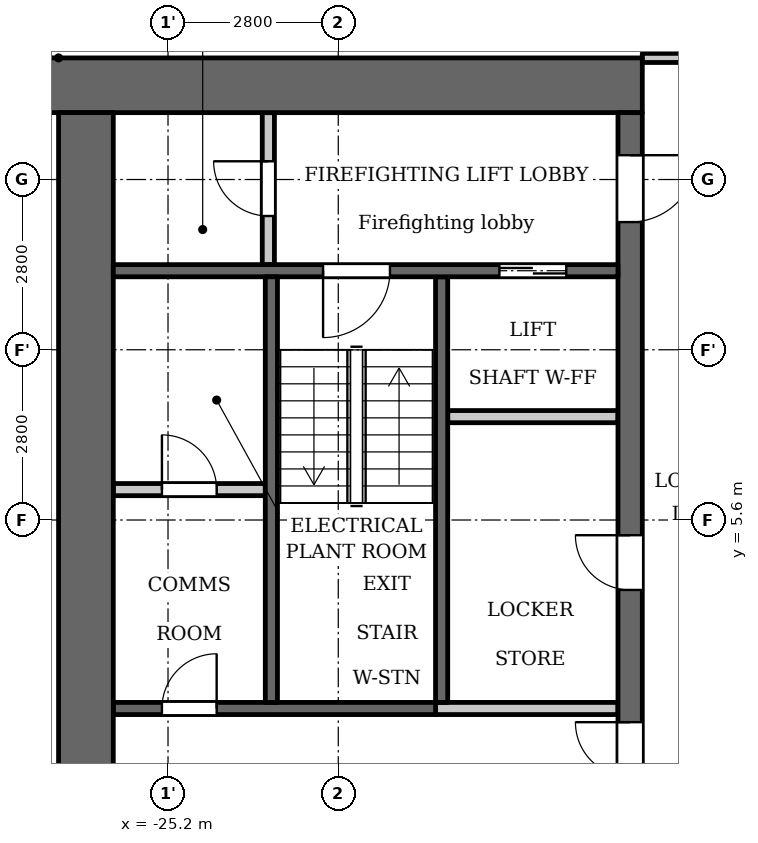
"""IFC4 building model, lengths in metres.
Left out: names, types, materials, properties, quantities, classifications, styles, units other than length and angle.
Written with IfcOpenShell. Run it as: python <this file> out.ifc"""

import sys

from ifc_helpers import new_model, si_unit, direction, frame, frame_2d, origin, place, context, subcontext, project, spatial, rectangle, extrude, element, fill, save


model = new_model("IFC4")
c1 = context("Model", 3, precision=1e-05, world=origin(), true_north=direction((0.0, 1.0)))
c2 = subcontext(c1, "Body", "Model", "MODEL_VIEW")
j1 = project(units=[si_unit("LENGTHUNIT", "METRE"), si_unit("PLANEANGLEUNIT", "RADIAN")], contexts=[c1])
p1 = place(None, origin())
s1 = spatial("IfcSite", under=j1, at=p1, CompositionType="ELEMENT")
p2 = place(p1, origin())
s2 = spatial("IfcBuilding", under=s1, at=p2, CompositionType="ELEMENT")
p3 = place(p2, frame((0.0, 0.0, 55.0)))
s3 = spatial("IfcBuildingStorey", under=s2, at=p3, CompositionType="ELEMENT", Elevation=55.0)
p4 = place(p3, frame((-20.7, 2.6, 0.0), z_axis=(0.0, 0.0, 1.0), x_axis=(0.0, 1.0, 0.0)))
e1 = element("IfcWall", 1, at=p4, inside=s3, PredefinedType="SHEAR", context=c2, shape_type="SweptSolid", body=[
    extrude(rectangle(XDim=7.0, YDim=0.2, at=frame_2d((3.5, 0.0))), origin(), (0.0, 0.0, 1.0), 3.2),
])
p5 = place(p3, frame((-20.8, 2.5, 0.0), z_axis=(0.0, 0.0, 1.0), x_axis=(-1.0, 0.0, 0.0)))
e2 = element("IfcWall", 2, at=p5, inside=s3, PredefinedType="SHEAR", context=c2, shape_type="SweptSolid", body=[
    extrude(rectangle(XDim=5.3, YDim=0.2, at=frame_2d((2.65, 0.0))), origin(), (0.0, 0.0, 1.0), 3.2),
])
p6 = place(p5, frame((3.6, 0.0, 0.0)))
e3 = element("IfcOpeningElement", 3, at=p6, cuts=e2, PredefinedType="OPENING", context=c2, shape_type="SweptSolid", body=[
    extrude(rectangle(XDim=0.9, YDim=2.1, at=frame_2d((0.45, 1.05))), frame((0.0, 0.11, 0.0), z_axis=(0.0, -1.0, 0.0), x_axis=(1.0, 0.0, 0.0)), (0.0, 0.0, 1.0), 0.22),
])
p7 = place(p3, frame((-17.4, 12.75, 0.0), z_axis=(0.0, 0.0, 1.0), x_axis=(-1.0, 0.0, 0.0)))
e4 = element("IfcWall", 4, at=p7, inside=s3, PredefinedType="SHEAR", context=c2, shape_type="SweptSolid", body=[
    extrude(rectangle(XDim=10.4, YDim=0.9, at=frame_2d((5.2, 0.0))), origin(), (0.0, 0.0, 1.0), 3.2),
])
p8 = place(p3, frame((-17.6, -12.3, 0.0), z_axis=(0.0, 0.0, 1.0), x_axis=(0.0, 1.0, 0.0)))
e5 = element("IfcWall", 5, at=p8, inside=s3, PredefinedType="SHEAR", context=c2, shape_type="SweptSolid", body=[
    extrude(rectangle(XDim=24.6, YDim=0.4, at=frame_2d((12.3, 0.0))), origin(), (0.0, 0.0, 1.0), 3.2),
])
p9 = place(p8, frame((6.0, 0.0, 0.0)))
e6 = element("IfcOpeningElement", 6, at=p9, cuts=e5, PredefinedType="OPENING", context=c2, shape_type="SweptSolid", body=[
    extrude(rectangle(XDim=1.1, YDim=2.1, at=frame_2d((0.55, 1.05))), frame((0.0, 0.21, 0.0), z_axis=(0.0, -1.0, 0.0), x_axis=(1.0, 0.0, 0.0)), (0.0, 0.0, 1.0), 0.42),
])
p10 = place(p8, frame((8.4, 0.0, 0.0)))
e7 = element("IfcOpeningElement", 7, at=p10, cuts=e5, PredefinedType="OPENING", context=c2, shape_type="SweptSolid", body=[
    extrude(rectangle(XDim=1.1, YDim=2.1, at=frame_2d((0.55, 1.05))), frame((0.0, 0.21, 0.0), z_axis=(0.0, -1.0, 0.0), x_axis=(1.0, 0.0, 0.0)), (0.0, 0.0, 1.0), 0.42),
])
p11 = place(p8, frame((10.8, 0.0, 0.0)))
e8 = element("IfcOpeningElement", 8, at=p11, cuts=e5, PredefinedType="OPENING", context=c2, shape_type="SweptSolid", body=[
    extrude(rectangle(XDim=1.1, YDim=2.1, at=frame_2d((0.55, 1.05))), frame((0.0, 0.21, 0.0), z_axis=(0.0, -1.0, 0.0), x_axis=(1.0, 0.0, 0.0)), (0.0, 0.0, 1.0), 0.42),
])
p12 = place(p8, frame((16.75, 0.0, 0.0)))
e9 = element("IfcOpeningElement", 9, at=p12, cuts=e5, PredefinedType="OPENING", context=c2, shape_type="SweptSolid", body=[
    extrude(rectangle(XDim=0.9, YDim=2.1, at=frame_2d((0.45, 1.05))), frame((0.0, 0.21, 0.0), z_axis=(0.0, -1.0, 0.0), x_axis=(1.0, 0.0, 0.0)), (0.0, 0.0, 1.0), 0.42),
])
p13 = place(p8, frame((22.8, 0.0, 0.0)))
e10 = element("IfcOpeningElement", 10, at=p13, cuts=e5, PredefinedType="OPENING", context=c2, shape_type="SweptSolid", body=[
    extrude(rectangle(XDim=1.1, YDim=2.1, at=frame_2d((0.55, 1.05))), frame((0.0, 0.21, 0.0), z_axis=(0.0, -1.0, 0.0), x_axis=(1.0, 0.0, 0.0)), (0.0, 0.0, 1.0), 0.42),
])
p14 = place(p8, frame((0.7, 0.0, 0.0)))
e11 = element("IfcOpeningElement", 11, at=p14, cuts=e5, PredefinedType="OPENING", context=c2, shape_type="SweptSolid", body=[
    extrude(rectangle(XDim=1.1, YDim=2.1, at=frame_2d((0.55, 1.05))), frame((0.0, 0.21, 0.0), z_axis=(0.0, -1.0, 0.0), x_axis=(1.0, 0.0, 0.0)), (0.0, 0.0, 1.0), 0.42),
])
p15 = place(p8, frame((12.775, 0.0, 0.0)))
e12 = element("IfcOpeningElement", 12, at=p15, cuts=e5, PredefinedType="OPENING", context=c2, shape_type="SweptSolid", body=[
    extrude(rectangle(XDim=1.8, YDim=2.1, at=frame_2d((0.9, 1.05))), frame((0.0, 0.21, 0.0), z_axis=(0.0, -1.0, 0.0), x_axis=(1.0, 0.0, 0.0)), (0.0, 0.0, 1.0), 0.42),
])
p16 = place(p3, frame((-26.55, -12.3, 0.0), z_axis=(0.0, 0.0, 1.0), x_axis=(0.0, 1.0, 0.0)))
e13 = element("IfcWall", 13, at=p16, inside=s3, PredefinedType="SHEAR", context=c2, shape_type="SweptSolid", body=[
    extrude(rectangle(XDim=24.6, YDim=0.9, at=frame_2d((12.3, 0.0))), origin(), (0.0, 0.0, 1.0), 3.2),
])
p17 = place(p3, frame((-23.55, 9.8, 0.0), z_axis=(0.0, 0.0, 1.0), x_axis=(0.0, 1.0, 0.0)))
e14 = element("IfcWall", 14, at=p17, inside=s3, PredefinedType="PARTITIONING", context=c2, shape_type="SweptSolid", body=[
    extrude(rectangle(XDim=2.5, YDim=0.2, at=frame_2d((1.25, 0.0))), origin(), (0.0, 0.0, 1.0), 3.2),
])
p18 = place(p17, frame((0.8, 0.0, 0.0)))
e15 = element("IfcOpeningElement", 15, at=p18, cuts=e14, PredefinedType="OPENING", context=c2, shape_type="SweptSolid", body=[
    extrude(rectangle(XDim=0.9, YDim=2.1, at=frame_2d((0.45, 1.05))), frame((0.0, 0.11, 0.0), z_axis=(0.0, -1.0, 0.0), x_axis=(1.0, 0.0, 0.0)), (0.0, 0.0, 1.0), 0.22),
])
p19 = place(p3, frame((-23.6, 6.1, 0.0), z_axis=(0.0, 0.0, 1.0), x_axis=(-1.0, 0.0, 0.0)))
e16 = element("IfcWall", 16, at=p19, inside=s3, PredefinedType="PARTITIONING", context=c2, shape_type="SweptSolid", body=[
    extrude(rectangle(XDim=2.5, YDim=0.2, at=frame_2d((1.25, 0.0))), origin(), (0.0, 0.0, 1.0), 3.2),
])
p20 = place(p19, frame((0.8, 0.0, 0.0)))
e17 = element("IfcOpeningElement", 17, at=p20, cuts=e16, PredefinedType="OPENING", context=c2, shape_type="SweptSolid", body=[
    extrude(rectangle(XDim=0.9, YDim=2.1, at=frame_2d((0.45, 1.05))), frame((0.0, 0.11, 0.0), z_axis=(0.0, -1.0, 0.0), x_axis=(1.0, 0.0, 0.0)), (0.0, 0.0, 1.0), 0.22),
])
p21 = place(p3, frame((-17.8, 2.5, 0.0), z_axis=(0.0, 0.0, 1.0), x_axis=(-1.0, 0.0, 0.0)))
e18 = element("IfcWall", 18, at=p21, inside=s3, PredefinedType="PARTITIONING", context=c2, shape_type="SweptSolid", body=[
    extrude(rectangle(XDim=3.0, YDim=0.2, at=frame_2d((1.5, 0.0))), origin(), (0.0, 0.0, 1.0), 3.2),
])
p22 = place(p3, frame((-17.8, 7.3, 0.0), z_axis=(0.0, 0.0, 1.0), x_axis=(-1.0, 0.0, 0.0)))
e19 = element("IfcWall", 19, at=p22, inside=s3, PredefinedType="PARTITIONING", context=c2, shape_type="SweptSolid", body=[
    extrude(rectangle(XDim=2.8, YDim=0.2, at=frame_2d((1.4, 0.0))), origin(), (0.0, 0.0, 1.0), 3.2),
])
p23 = place(p3, frame((-17.8, 9.7, 0.0), z_axis=(0.0, 0.0, 1.0), x_axis=(-1.0, 0.0, 0.0)))
e20 = element("IfcWall", 20, at=p23, inside=s3, PredefinedType="SHEAR", context=c2, shape_type="SweptSolid", body=[
    extrude(rectangle(XDim=8.3, YDim=0.2, at=frame_2d((4.15, 0.0))), origin(), (0.0, 0.0, 1.0), 3.2),
])
p24 = place(p23, frame((0.85, 0.0, 0.0)))
e21 = element("IfcOpeningElement", 21, at=p24, cuts=e20, PredefinedType="OPENING", context=c2, shape_type="SweptSolid", body=[
    extrude(rectangle(XDim=1.1, YDim=2.1, at=frame_2d((0.55, 1.05))), frame((0.0, 0.11, 0.0), z_axis=(0.0, -1.0, 0.0), x_axis=(1.0, 0.0, 0.0)), (0.0, 0.0, 1.0), 0.22),
])
p25 = place(p23, frame((3.75, 0.0, 0.0)))
e22 = element("IfcOpeningElement", 22, at=p25, cuts=e20, PredefinedType="OPENING", context=c2, shape_type="SweptSolid", body=[
    extrude(rectangle(XDim=1.1, YDim=2.1, at=frame_2d((0.55, 1.05))), frame((0.0, 0.11, 0.0), z_axis=(0.0, -1.0, 0.0), x_axis=(1.0, 0.0, 0.0)), (0.0, 0.0, 1.0), 0.22),
])
p26 = place(p3, frame((-23.5, 2.6, 0.0), z_axis=(0.0, 0.0, 1.0), x_axis=(0.0, 1.0, 0.0)))
e23 = element("IfcWall", 23, at=p26, inside=s3, PredefinedType="SHEAR", context=c2, shape_type="SweptSolid", body=[
    extrude(rectangle(XDim=7.0, YDim=0.2, at=frame_2d((3.5, 0.0))), origin(), (0.0, 0.0, 1.0), 3.2),
])
p27 = place(p3, frame((-17.4, 13.2, 0.0), z_axis=(0.0, 0.0, 1.0), x_axis=(1.0, 0.0, 0.0)))
e24 = element("IfcWall", 24, at=p27, inside=s3, PredefinedType="PARTITIONING", context=c2, shape_type="SweptSolid", body=[
    extrude(rectangle(XDim=34.8, YDim=0.15, at=frame_2d((17.4, 0.0))), origin(), (0.0, 0.0, 1.0), 3.2),
])
p28 = place(p27, frame((0.75, 0.0, 0.0)))
e25 = element("IfcOpeningElement", 25, at=p28, cuts=e24, PredefinedType="OPENING", context=c2, shape_type="SweptSolid", body=[
    extrude(rectangle(XDim=1.0, YDim=2.1, at=frame_2d((0.5, 1.05))), frame((0.0, 0.085, 0.0), z_axis=(0.0, -1.0, 0.0), x_axis=(1.0, 0.0, 0.0)), (0.0, 0.0, 1.0), 0.17),
])
p29 = place(p27, frame((33.15, 0.0, 0.0)))
e26 = element("IfcOpeningElement", 26, at=p29, cuts=e24, PredefinedType="OPENING", context=c2, shape_type="SweptSolid", body=[
    extrude(rectangle(XDim=1.0, YDim=2.1, at=frame_2d((0.5, 1.05))), frame((0.0, 0.085, 0.0), z_axis=(0.0, -1.0, 0.0), x_axis=(1.0, 0.0, 0.0)), (0.0, 0.0, 1.0), 0.17),
])
p30 = place(p27, frame((6.85, 0.0, 0.0)))
e27 = element("IfcOpeningElement", 27, at=p30, cuts=e24, PredefinedType="OPENING", context=c2, shape_type="SweptSolid", body=[
    extrude(rectangle(XDim=1.0, YDim=2.1, at=frame_2d((0.5, 1.05))), frame((0.0, 0.085, 0.0), z_axis=(0.0, -1.0, 0.0), x_axis=(1.0, 0.0, 0.0)), (0.0, 0.0, 1.0), 0.17),
])
p31 = place(p27, frame((18.05, 0.0, 0.0)))
e28 = element("IfcOpeningElement", 28, at=p31, cuts=e24, PredefinedType="OPENING", context=c2, shape_type="SweptSolid", body=[
    extrude(rectangle(XDim=1.0, YDim=2.1, at=frame_2d((0.5, 1.05))), frame((0.0, 0.085, 0.0), z_axis=(0.0, -1.0, 0.0), x_axis=(1.0, 0.0, 0.0)), (0.0, 0.0, 1.0), 0.17),
])
p32 = place(p27, frame((29.25, 0.0, 0.0)))
e29 = element("IfcOpeningElement", 29, at=p32, cuts=e24, PredefinedType="OPENING", context=c2, shape_type="SweptSolid", body=[
    extrude(rectangle(XDim=1.0, YDim=2.1, at=frame_2d((0.5, 1.05))), frame((0.0, 0.085, 0.0), z_axis=(0.0, -1.0, 0.0), x_axis=(1.0, 0.0, 0.0)), (0.0, 0.0, 1.0), 0.17),
])
p33 = place(p12, origin())
e30 = element("IfcDoor", 30, at=p33, inside=s3, OperationType="SINGLE_SWING_LEFT", PredefinedType="DOOR", context=c2, shape_type="SweptSolid", body=[
    extrude(rectangle(XDim=0.9, YDim=2.1, at=frame_2d((0.45, 1.05))), frame((0.0, 0.025, 0.0), z_axis=(0.0, -1.0, 0.0), x_axis=(1.0, 0.0, 0.0)), (0.0, 0.0, 1.0), 0.05),
])
fill(e9, e30)
p34 = place(p24, origin())
e31 = element("IfcDoor", 31, at=p34, inside=s3, OperationType="DOUBLE_DOOR_SLIDING", PredefinedType="DOOR", context=c2, shape_type="SweptSolid", body=[
    extrude(rectangle(XDim=1.1, YDim=2.1, at=frame_2d((0.55, 1.05))), frame((0.0, 0.025, 0.0), z_axis=(0.0, -1.0, 0.0), x_axis=(1.0, 0.0, 0.0)), (0.0, 0.0, 1.0), 0.05),
])
fill(e21, e31)
p35 = place(p13, origin())
e32 = element("IfcDoor", 32, at=p35, inside=s3, OperationType="SINGLE_SWING_RIGHT", PredefinedType="DOOR", context=c2, shape_type="SweptSolid", body=[
    extrude(rectangle(XDim=1.1, YDim=2.1, at=frame_2d((0.55, 1.05))), frame((0.0, 0.025, 0.0), z_axis=(0.0, -1.0, 0.0), x_axis=(1.0, 0.0, 0.0)), (0.0, 0.0, 1.0), 0.05),
])
fill(e10, e32)
p36 = place(p18, origin())
e33 = element("IfcDoor", 33, at=p36, inside=s3, OperationType="SINGLE_SWING_LEFT", PredefinedType="DOOR", context=c2, shape_type="SweptSolid", body=[
    extrude(rectangle(XDim=0.9, YDim=2.1, at=frame_2d((0.45, 1.05))), frame((0.0, 0.025, 0.0), z_axis=(0.0, -1.0, 0.0), x_axis=(1.0, 0.0, 0.0)), (0.0, 0.0, 1.0), 0.05),
])
fill(e15, e33)
p37 = place(p25, origin())
e34 = element("IfcDoor", 34, at=p37, inside=s3, OperationType="SINGLE_SWING_LEFT", PredefinedType="DOOR", context=c2, shape_type="SweptSolid", body=[
    extrude(rectangle(XDim=1.1, YDim=2.1, at=frame_2d((0.55, 1.05))), frame((0.0, 0.025, 0.0), z_axis=(0.0, -1.0, 0.0), x_axis=(1.0, 0.0, 0.0)), (0.0, 0.0, 1.0), 0.05),
])
fill(e22, e34)
p38 = place(p15, origin())
e35 = element("IfcDoor", 35, at=p38, inside=s3, OperationType="DOUBLE_DOOR_SINGLE_SWING", PredefinedType="DOOR", context=c2, shape_type="SweptSolid", body=[
    extrude(rectangle(XDim=1.8, YDim=2.1, at=frame_2d((0.9, 1.05))), frame((0.0, 0.025, 0.0), z_axis=(0.0, -1.0, 0.0), x_axis=(1.0, 0.0, 0.0)), (0.0, 0.0, 1.0), 0.05),
])
fill(e12, e35)
p39 = place(p20, origin())
e36 = element("IfcDoor", 36, at=p39, inside=s3, OperationType="SINGLE_SWING_RIGHT", PredefinedType="DOOR", context=c2, shape_type="SweptSolid", body=[
    extrude(rectangle(XDim=0.9, YDim=2.1, at=frame_2d((0.45, 1.05))), frame((0.0, 0.025, 0.0), z_axis=(0.0, -1.0, 0.0), x_axis=(1.0, 0.0, 0.0)), (0.0, 0.0, 1.0), 0.05),
])
fill(e17, e36)
p40 = place(p6, origin())
e37 = element("IfcDoor", 37, at=p40, inside=s3, OperationType="SINGLE_SWING_LEFT", PredefinedType="DOOR", context=c2, shape_type="SweptSolid", body=[
    extrude(rectangle(XDim=0.9, YDim=2.1, at=frame_2d((0.45, 1.05))), frame((0.0, 0.025, 0.0), z_axis=(0.0, -1.0, 0.0), x_axis=(1.0, 0.0, 0.0)), (0.0, 0.0, 1.0), 0.05),
])
fill(e3, e37)
save(model, sys.argv[1])
